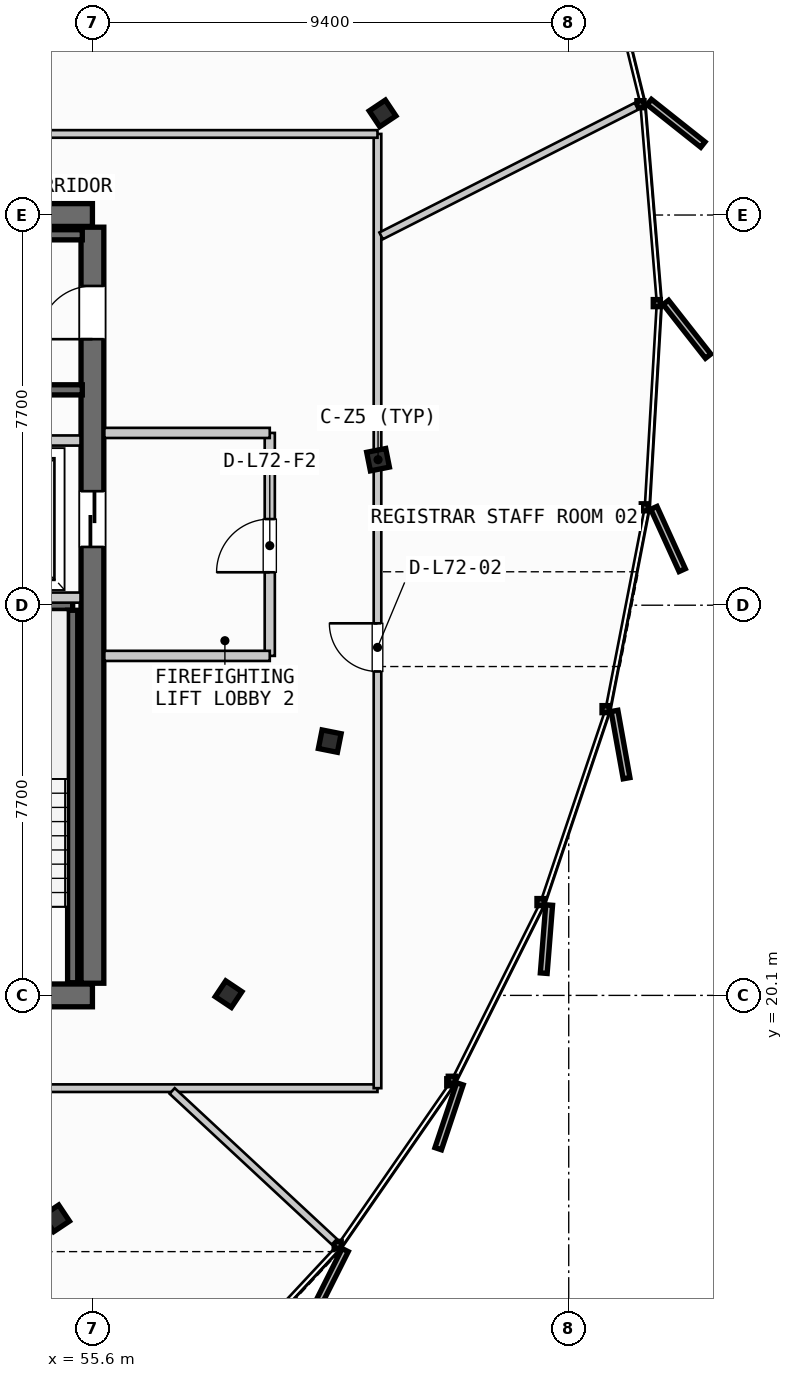
"""IFC4 building model, lengths in metres.
Left out: names, types, materials, properties, quantities, classifications, styles, units other than length and angle.
Written with IfcOpenShell. Run it as: python <this file> out.ifc"""

import sys

from ifc_helpers import new_model, si_unit, direction, frame, frame_2d, origin, origin_2d, place, context, subcontext, project, spatial, rectangle, i_section, extrude, source, transform, mapped, element, fill, save


model = new_model("IFC4")
c1 = context("Model", 3, precision=1e-05, world=origin(), true_north=direction((0.0, 1.0)))
c2 = subcontext(c1, "Body", "Model", "MODEL_VIEW")
j1 = project(units=[si_unit("LENGTHUNIT", "METRE"), si_unit("PLANEANGLEUNIT", "RADIAN")], contexts=[c1])
p1 = place(None, origin())
s1 = spatial("IfcSite", under=j1, at=p1, CompositionType="ELEMENT")
p2 = place(p1, origin())
s2 = spatial("IfcBuilding", under=s1, at=p2, CompositionType="ELEMENT")
p3 = place(p2, frame((0.0, 0.0, 273.25)))
s3 = spatial("IfcBuildingStorey", under=s2, at=p3, CompositionType="ELEMENT", Elevation=273.25)
p4 = place(p3, frame((38.0, 20.1, 0.0), z_axis=(0.0, 0.0, 1.0), x_axis=(1.0, 0.0, 0.0)))
e1 = element("IfcWall", 1, at=p4, inside=s3, PredefinedType="SHEAR", context=c2, shape_type="SweptSolid", body=[
    extrude(rectangle(XDim=17.6, YDim=0.45, at=frame_2d((8.8, 0.0))), origin(), (0.0, 0.0, 1.0), 3.21),
])
p5 = place(p4, frame((1.4, 0.0, 0.0)))
e2 = element("IfcOpeningElement", 2, at=p5, cuts=e1, PredefinedType="OPENING", context=c2, shape_type="SweptSolid", body=[
    extrude(rectangle(XDim=1.05, YDim=2.15, at=frame_2d((0.525, 1.075))), frame((0.0, 0.235, 0.0), z_axis=(0.0, -1.0, 0.0), x_axis=(1.0, 0.0, 0.0)), (0.0, 0.0, 1.0), 0.47),
])
p6 = place(p4, frame((15.15, 0.0, 0.0)))
e3 = element("IfcOpeningElement", 3, at=p6, cuts=e1, PredefinedType="OPENING", context=c2, shape_type="SweptSolid", body=[
    extrude(rectangle(XDim=1.05, YDim=2.15, at=frame_2d((0.525, 1.075))), frame((0.0, 0.235, 0.0), z_axis=(0.0, -1.0, 0.0), x_axis=(1.0, 0.0, 0.0)), (0.0, 0.0, 1.0), 0.47),
])
p7 = place(p4, frame((5.25, 0.0, 0.0)))
e4 = element("IfcOpeningElement", 4, at=p7, cuts=e1, PredefinedType="OPENING", context=c2, shape_type="SweptSolid", body=[
    extrude(rectangle(XDim=0.95, YDim=2.15, at=frame_2d((0.475, 1.075))), frame((0.0, 0.235, 0.0), z_axis=(0.0, -1.0, 0.0), x_axis=(1.0, 0.0, 0.0)), (0.0, 0.0, 1.0), 0.47),
])
p8 = place(p4, frame((11.4, 0.0, 0.0)))
e5 = element("IfcOpeningElement", 5, at=p8, cuts=e1, PredefinedType="OPENING", context=c2, shape_type="SweptSolid", body=[
    extrude(rectangle(XDim=0.95, YDim=2.15, at=frame_2d((0.475, 1.075))), frame((0.0, 0.235, 0.0), z_axis=(0.0, -1.0, 0.0), x_axis=(1.0, 0.0, 0.0)), (0.0, 0.0, 1.0), 0.47),
])
p9 = place(p3, frame((55.6, 35.5, 0.0), z_axis=(0.0, 0.0, 1.0), x_axis=(-1.0, 0.0, 0.0)))
e6 = element("IfcWall", 6, at=p9, inside=s3, PredefinedType="SHEAR", context=c2, shape_type="SweptSolid", body=[
    extrude(rectangle(XDim=17.6, YDim=0.45, at=frame_2d((8.8, 0.0))), origin(), (0.0, 0.0, 1.0), 3.21),
])
p10 = place(p9, frame((8.05, 0.0, 0.0)))
e7 = element("IfcOpeningElement", 7, at=p10, cuts=e6, PredefinedType="OPENING", context=c2, shape_type="SweptSolid", body=[
    extrude(rectangle(XDim=1.5, YDim=2.2, at=frame_2d((0.75, 1.1))), frame((0.0, 0.235, 0.0), z_axis=(0.0, -1.0, 0.0), x_axis=(1.0, 0.0, 0.0)), (0.0, 0.0, 1.0), 0.47),
])
p11 = place(p9, frame((15.85, 0.0, 0.0)))
e8 = element("IfcOpeningElement", 8, at=p11, cuts=e6, PredefinedType="OPENING", context=c2, shape_type="SweptSolid", body=[
    extrude(rectangle(XDim=0.85, YDim=2.15, at=frame_2d((0.425, 1.075))), frame((0.0, 0.235, 0.0), z_axis=(0.0, -1.0, 0.0), x_axis=(1.0, 0.0, 0.0)), (0.0, 0.0, 1.0), 0.47),
])
p12 = place(p9, frame((14.35, 0.0, 0.0)))
e9 = element("IfcOpeningElement", 9, at=p12, cuts=e6, PredefinedType="OPENING", context=c2, shape_type="SweptSolid", body=[
    extrude(rectangle(XDim=0.85, YDim=2.15, at=frame_2d((0.425, 1.075))), frame((0.0, 0.235, 0.0), z_axis=(0.0, -1.0, 0.0), x_axis=(1.0, 0.0, 0.0)), (0.0, 0.0, 1.0), 0.47),
])
p13 = place(p9, frame((12.3, 0.0, 0.0)))
e10 = element("IfcOpeningElement", 10, at=p13, cuts=e6, PredefinedType="OPENING", context=c2, shape_type="SweptSolid", body=[
    extrude(rectangle(XDim=0.95, YDim=2.15, at=frame_2d((0.475, 1.075))), frame((0.0, 0.235, 0.0), z_axis=(0.0, -1.0, 0.0), x_axis=(1.0, 0.0, 0.0)), (0.0, 0.0, 1.0), 0.47),
])
p14 = place(p9, frame((10.2, 0.0, 0.0)))
e11 = element("IfcOpeningElement", 11, at=p14, cuts=e6, PredefinedType="OPENING", context=c2, shape_type="SweptSolid", body=[
    extrude(rectangle(XDim=0.9, YDim=2.15, at=frame_2d((0.45, 1.075))), frame((0.0, 0.235, 0.0), z_axis=(0.0, -1.0, 0.0), x_axis=(1.0, 0.0, 0.0)), (0.0, 0.0, 1.0), 0.47),
])
p15 = place(p3, frame((55.6, 20.34, 0.0), z_axis=(0.0, 0.0, 1.0), x_axis=(0.0, 1.0, 0.0)))
e12 = element("IfcWall", 12, at=p15, inside=s3, PredefinedType="SHEAR", context=c2, shape_type="SweptSolid", body=[
    extrude(rectangle(XDim=14.92, YDim=0.45, at=frame_2d((7.46, 0.0))), origin(), (0.0, 0.0, 1.0), 3.21),
])
p16 = place(p15, frame((12.71, 0.0, 0.0)))
e13 = element("IfcOpeningElement", 13, at=p16, cuts=e12, PredefinedType="OPENING", context=c2, shape_type="SweptSolid", body=[
    extrude(rectangle(XDim=1.05, YDim=2.15, at=frame_2d((0.525, 1.075))), frame((0.0, 0.235, 0.0), z_axis=(0.0, -1.0, 0.0), x_axis=(1.0, 0.0, 0.0)), (0.0, 0.0, 1.0), 0.47),
])
p17 = place(p15, frame((8.61, 0.0, 0.0)))
e14 = element("IfcOpeningElement", 14, at=p17, cuts=e12, PredefinedType="OPENING", context=c2, shape_type="SweptSolid", body=[
    extrude(rectangle(XDim=1.1, YDim=2.2, at=frame_2d((0.55, 1.1))), frame((0.0, 0.235, 0.0), z_axis=(0.0, -1.0, 0.0), x_axis=(1.0, 0.0, 0.0)), (0.0, 0.0, 1.0), 0.47),
])
m1 = source(origin(), c2, "Body", "SweptSolid", [
    extrude(i_section(OverallWidth=0.374, OverallDepth=0.383, WebThickness=0.017, FlangeThickness=0.026, FilletRadius=0.015, at=origin_2d()), origin(), (0.0, 0.0, 1.0), 3.21),
])
for number, where, z_axis, x_axis in (
    (15, (61.237, 30.672, 0.0), (0.0, 0.0, 1.0), (0.981, 0.195, 0.0)),
    (16, (61.326, 37.506, 0.0), (0.0, 0.0, 1.0), (0.831, 0.556, 0.0)),
    (17, (54.885, 15.7, 0.0), (0.0, 0.0, 1.0), (0.556, -0.831, 0.0)),
    (18, (58.287, 20.125, 0.0), (0.0, 0.0, 1.0), (0.831, -0.556, 0.0)),
    (19, (60.284, 25.118, 0.0), (0.0, 0.0, 1.0), (0.981, -0.195, 0.0)),
):
    element("IfcColumn", number, at=place(p3, frame(where, z_axis=z_axis, x_axis=x_axis)), inside=s3, PredefinedType="COLUMN", context=c2, shape_type="MappedRepresentation", body=[
        mapped(m1, transform((0.0, 0.0, 0.0), scale=1.0)),
    ])
p18 = place(p3, frame((52.15, 27.8, 0.0), z_axis=(0.0, 0.0, 1.0), x_axis=(1.0, 0.0, 0.0)))
e20 = element("IfcWall", 20, at=p18, inside=s3, PredefinedType="SHEAR", context=c2, shape_type="SweptSolid", body=[
    extrude(rectangle(XDim=3.06, YDim=0.2, at=frame_2d((1.53, 0.0))), origin(), (0.0, 0.0, 1.0), 3.21),
])
for number, where, z_axis, x_axis in (
    (21, (55.21, 27.7, 0.0), (0.0, 0.0, 1.0), (0.0, -1.0, 0.0)),
    (22, (48.05, 35.11, 0.0), (0.0, 0.0, 1.0), (1.0, 0.0, 0.0)),
    (23, (55.4, 32.05, 0.0), (0.0, 0.0, 1.0), (-1.0, 0.0, 0.0)),
):
    element("IfcWall", number, at=place(p3, frame(where, z_axis=z_axis, x_axis=x_axis)), inside=s3, PredefinedType="SHEAR", context=c2, shape_type="SweptSolid", body=[
        extrude(rectangle(XDim=7.35, YDim=0.2, at=frame_2d((3.675, 0.0))), origin(), (0.0, 0.0, 1.0), 3.21),
    ])
for number, where, z_axis, x_axis in (
    (24, (52.45, 27.95, 0.0), (0.0, 0.0, 1.0), (1.0, 0.0, 0.0)),
    (25, (52.45, 31.05, 0.0), (0.0, 0.0, 1.0), (1.0, 0.0, 0.0)),
):
    element("IfcWall", number, at=place(p3, frame(where, z_axis=z_axis, x_axis=x_axis)), inside=s3, PredefinedType="PARTITIONING", context=c2, shape_type="SweptSolid", body=[
        extrude(rectangle(XDim=2.915, YDim=0.2, at=frame_2d((1.458, 0.0))), origin(), (0.0, 0.0, 1.0), 2.595),
    ])
p19 = place(p3, frame((59.1, 26.8, 0.0), z_axis=(0.0, 0.0, 1.0), x_axis=(0.0, 1.0, 0.0)))
e26 = element("IfcWall", 26, at=p19, inside=s3, PredefinedType="PARTITIONING", context=c2, shape_type="SweptSolid", body=[
    extrude(rectangle(XDim=4.4, YDim=0.2, at=frame_2d((2.2, 0.0))), origin(), (0.0, 0.0, 1.0), 2.595),
])
p20 = place(p19, frame((1.65, 0.0, 0.0)))
e27 = element("IfcOpeningElement", 27, at=p20, cuts=e26, PredefinedType="OPENING", context=c2, shape_type="SweptSolid", body=[
    extrude(rectangle(XDim=1.05, YDim=2.15, at=frame_2d((0.525, 1.075))), frame((0.0, 0.11, 0.0), z_axis=(0.0, -1.0, 0.0), x_axis=(1.0, 0.0, 0.0)), (0.0, 0.0, 1.0), 0.22),
])
for number, where, z_axis, x_axis in (
    (28, (55.835, 26.8, 0.0), (0.0, 0.0, 1.0), (1.0, 0.0, 0.0)),
    (29, (55.835, 31.2, 0.0), (0.0, 0.0, 1.0), (1.0, 0.0, 0.0)),
):
    element("IfcWall", number, at=place(p3, frame(where, z_axis=z_axis, x_axis=x_axis)), inside=s3, PredefinedType="PARTITIONING", context=c2, shape_type="SweptSolid", body=[
        extrude(rectangle(XDim=3.265, YDim=0.2, at=frame_2d((1.633, 0.0))), origin(), (0.0, 0.0, 1.0), 2.595),
    ])
p21 = place(p3, frame((32.07, 18.269, 0.0), z_axis=(0.0, 0.0, 1.0), x_axis=(1.0, 0.0, 0.0)))
e30 = element("IfcWall", 30, at=p21, inside=s3, PredefinedType="PARTITIONING", context=c2, shape_type="SweptSolid", body=[
    extrude(rectangle(XDim=29.156, YDim=0.15, at=frame_2d((14.578, 0.0))), origin(), (0.0, 0.0, 1.0), 2.595),
])
p22 = place(p21, frame((12.404, 0.0, 0.0)))
e31 = element("IfcOpeningElement", 31, at=p22, cuts=e30, PredefinedType="OPENING", context=c2, shape_type="SweptSolid", body=[
    extrude(rectangle(XDim=0.95, YDim=2.15, at=frame_2d((0.475, 1.075))), frame((0.0, 0.085, 0.0), z_axis=(0.0, -1.0, 0.0), x_axis=(1.0, 0.0, 0.0)), (0.0, 0.0, 1.0), 0.17),
])
p23 = place(p3, frame((61.226, 18.269, 0.0), z_axis=(0.0, 0.0, 1.0), x_axis=(0.0, 1.0, 0.0)))
e32 = element("IfcWall", 32, at=p23, inside=s3, PredefinedType="PARTITIONING", context=c2, shape_type="SweptSolid", body=[
    extrude(rectangle(XDim=18.831, YDim=0.15, at=frame_2d((9.416, 0.0))), origin(), (0.0, 0.0, 1.0), 2.595),
])
p24 = place(p23, frame((8.224, 0.0, 0.0)))
e33 = element("IfcOpeningElement", 33, at=p24, cuts=e32, PredefinedType="OPENING", context=c2, shape_type="SweptSolid", body=[
    extrude(rectangle(XDim=0.95, YDim=2.15, at=frame_2d((0.475, 1.075))), frame((0.0, 0.085, 0.0), z_axis=(0.0, -1.0, 0.0), x_axis=(1.0, 0.0, 0.0)), (0.0, 0.0, 1.0), 0.17),
])
p25 = place(p3, frame((61.226, 37.1, 0.0), z_axis=(0.0, 0.0, 1.0), x_axis=(-1.0, 0.0, 0.0)))
e34 = element("IfcWall", 34, at=p25, inside=s3, PredefinedType="PARTITIONING", context=c2, shape_type="SweptSolid", body=[
    extrude(rectangle(XDim=29.156, YDim=0.15, at=frame_2d((14.578, 0.0))), origin(), (0.0, 0.0, 1.0), 2.595),
])
p26 = place(p25, frame((12.11, 0.0, 0.0)))
e35 = element("IfcOpeningElement", 35, at=p26, cuts=e34, PredefinedType="OPENING", context=c2, shape_type="SweptSolid", body=[
    extrude(rectangle(XDim=0.95, YDim=2.15, at=frame_2d((0.475, 1.075))), frame((0.0, 0.085, 0.0), z_axis=(0.0, -1.0, 0.0), x_axis=(1.0, 0.0, 0.0)), (0.0, 0.0, 1.0), 0.17),
])
p27 = place(p3, frame((57.173, 18.215, 0.0), z_axis=(0.0, 0.0, 1.0), x_axis=(0.732357713439, -0.680920097784, 0.0)))
e36 = element("IfcWall", 36, at=p27, inside=s3, PredefinedType="PARTITIONING", context=c2, shape_type="SweptSolid", body=[
    extrude(rectangle(XDim=4.371, YDim=0.15, at=frame_2d((2.186, 0.0))), origin(), (0.0, 0.0, 1.0), 2.595),
])
p28 = place(p3, frame((61.297, 35.089, 0.0), z_axis=(0.0, 0.0, 1.0), x_axis=(0.891723117969, 0.452581352774, 0.0)))
e37 = element("IfcWall", 37, at=p28, inside=s3, PredefinedType="PARTITIONING", context=c2, shape_type="SweptSolid", body=[
    extrude(rectangle(XDim=5.65, YDim=0.15, at=frame_2d((2.825, 0.0))), origin(), (0.0, 0.0, 1.0), 2.595),
])
m2 = source(origin(), c2, "Body", "SweptSolid", [
    extrude(rectangle(XDim=1.05, YDim=2.15, at=frame_2d((0.525, 1.075))), frame((0.0, 0.025, 0.0), z_axis=(0.0, -1.0, 0.0), x_axis=(1.0, 0.0, 0.0)), (0.0, 0.0, 1.0), 0.05),
])
p29 = place(p16, origin())
e38 = element("IfcDoor", 38, at=p29, inside=s3, OperationType="SINGLE_SWING_LEFT", PredefinedType="DOOR", context=c2, shape_type="MappedRepresentation", body=[
    mapped(m2, transform((0.0, 0.0, 0.0), scale=1.0)),
])
fill(e13, e38)
m3 = source(origin(), c2, "Body", "SweptSolid", [
    extrude(rectangle(XDim=1.1, YDim=2.2, at=frame_2d((0.55, 1.1))), frame((0.0, 0.025, 0.0), z_axis=(0.0, -1.0, 0.0), x_axis=(1.0, 0.0, 0.0)), (0.0, 0.0, 1.0), 0.05),
])
p30 = place(p17, origin())
e39 = element("IfcDoor", 39, at=p30, inside=s3, OperationType="SLIDING_TO_RIGHT", PredefinedType="DOOR", context=c2, shape_type="MappedRepresentation", body=[
    mapped(m3, transform((0.0, 0.0, 0.0), scale=1.0)),
])
fill(e14, e39)
p31 = place(p20, origin())
e40 = element("IfcDoor", 40, at=p31, inside=s3, OperationType="SINGLE_SWING_LEFT", PredefinedType="DOOR", context=c2, shape_type="MappedRepresentation", body=[
    mapped(m2, transform((0.0, 0.0, 0.0), scale=1.0)),
])
fill(e27, e40)
m4 = source(origin(), c2, "Body", "SweptSolid", [
    extrude(rectangle(XDim=0.95, YDim=2.15, at=frame_2d((0.475, 1.075))), frame((0.0, 0.025, 0.0), z_axis=(0.0, -1.0, 0.0), x_axis=(1.0, 0.0, 0.0)), (0.0, 0.0, 1.0), 0.05),
])
p32 = place(p24, origin())
e41 = element("IfcDoor", 41, at=p32, inside=s3, OperationType="SINGLE_SWING_RIGHT", PredefinedType="DOOR", context=c2, shape_type="MappedRepresentation", body=[
    mapped(m4, transform((0.0, 0.0, 0.0), scale=1.0)),
])
fill(e33, e41)
save(model, sys.argv[1])
